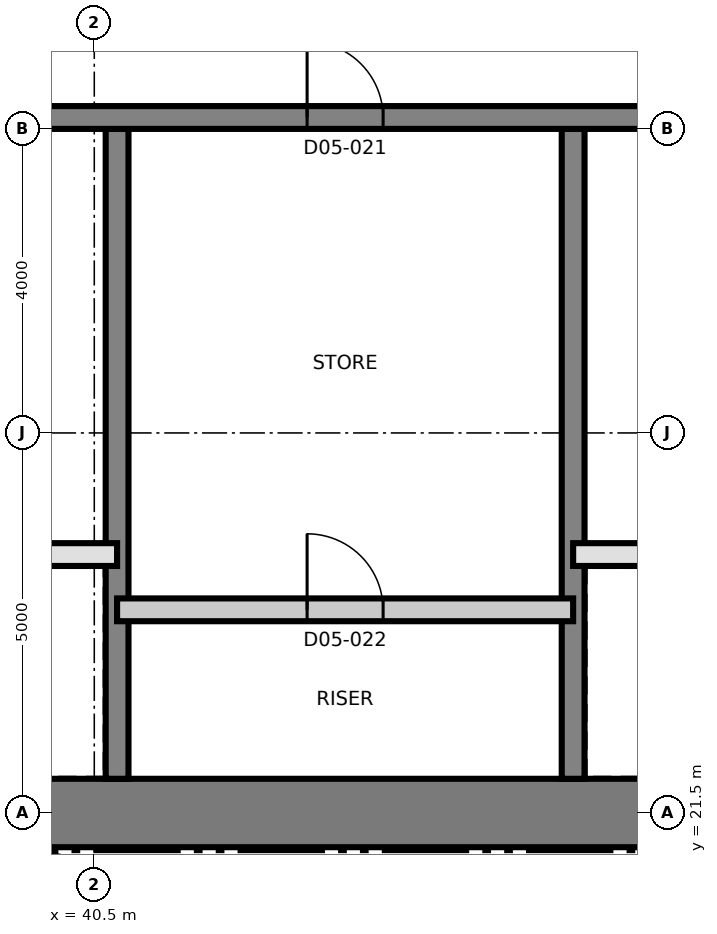
"""IFC4 building model, lengths in metres.
Left out: names, types, materials, properties, quantities, classifications, styles, units other than length and angle.
Written with IfcOpenShell. Run it as: python <this file> out.ifc"""

import sys

from ifc_helpers import new_model, si_unit, direction, frame, frame_2d, origin, place, context, subcontext, project, spatial, rectangle, extrude, element, fill, save


model = new_model("IFC4")
c1 = context("Model", 3, precision=1e-05, world=origin(), true_north=direction((0.0, 1.0)))
c2 = subcontext(c1, "Body", "Model", "MODEL_VIEW")
j1 = project(units=[si_unit("LENGTHUNIT", "METRE"), si_unit("PLANEANGLEUNIT", "RADIAN")], contexts=[c1])
p1 = place(None, origin())
s1 = spatial("IfcSite", under=j1, at=p1, CompositionType="ELEMENT")
p2 = place(p1, origin())
s2 = spatial("IfcBuilding", under=s1, at=p2, CompositionType="ELEMENT")
p3 = place(p2, frame((0.0, 0.0, 70.5)))
s3 = spatial("IfcBuildingStorey", under=s2, at=p3, CompositionType="ELEMENT", Elevation=70.5)
p4 = place(p3, frame((31.05, 21.5, 0.0), z_axis=(0.0, 0.0, 1.0), x_axis=(1.0, 0.0, 0.0)))
e1 = element("IfcWall", 1, at=p4, inside=s3, PredefinedType="SHEAR", context=c2, shape_type="SweptSolid", body=[
    extrude(rectangle(XDim=27.0, YDim=0.9, at=frame_2d((13.5, 0.0))), origin(), (0.0, 0.0, 1.0), 3.7),
])
for number, where, z_axis, x_axis in (
    (2, (40.8, 21.95, 0.0), (0.0, 0.0, 1.0), (0.0, 1.0, 0.0)),
    (3, (46.8, 21.95, 0.0), (0.0, 0.0, 1.0), (0.0, 1.0, 0.0)),
):
    element("IfcWall", number, at=place(p3, frame(where, z_axis=z_axis, x_axis=x_axis)), inside=s3, PredefinedType="SHEAR", context=c2, shape_type="SweptSolid", body=[
        extrude(rectangle(XDim=8.55, YDim=0.3, at=frame_2d((4.275, 0.0))), origin(), (0.0, 0.0, 1.0), 3.7),
    ])
p5 = place(p3, frame((31.95, 30.65, 0.0), z_axis=(0.0, 0.0, 1.0), x_axis=(1.0, 0.0, 0.0)))
e4 = element("IfcWall", 4, at=p5, inside=s3, PredefinedType="SHEAR", context=c2, shape_type="SweptSolid", body=[
    extrude(rectangle(XDim=26.1, YDim=0.3, at=frame_2d((13.05, 0.0))), origin(), (0.0, 0.0, 1.0), 3.7),
])
p6 = place(p5, frame((24.55, 0.0, 0.0)))
e5 = element("IfcOpeningElement", 5, at=p6, cuts=e4, PredefinedType="OPENING", context=c2, shape_type="SweptSolid", body=[
    extrude(rectangle(XDim=1.0, YDim=2.1, at=frame_2d((0.5, 1.05))), frame((0.0, 0.16, 0.0), z_axis=(0.0, -1.0, 0.0), x_axis=(1.0, 0.0, 0.0)), (0.0, 0.0, 1.0), 0.32),
])
p7 = place(p5, frame((11.35, 0.0, 0.0)))
e6 = element("IfcOpeningElement", 6, at=p7, cuts=e4, PredefinedType="OPENING", context=c2, shape_type="SweptSolid", body=[
    extrude(rectangle(XDim=1.0, YDim=2.1, at=frame_2d((0.5, 1.05))), frame((0.0, 0.16, 0.0), z_axis=(0.0, -1.0, 0.0), x_axis=(1.0, 0.0, 0.0)), (0.0, 0.0, 1.0), 0.32),
])
p8 = place(p3, frame((39.735, 20.846, 0.0), z_axis=(0.0, 0.0, 1.0), x_axis=(0.97206095595, -0.234728562212, 0.0)))
e7 = element("IfcWall", 7, at=p8, inside=s3, PredefinedType="SOLIDWALL", context=c2, shape_type="SweptSolid", body=[
    extrude(rectangle(XDim=2.35, YDim=0.3, at=frame_2d((1.175, 0.0))), origin(), (0.0, 0.0, 1.0), 3.4),
])
p9 = place(p3, frame((40.8, 24.173, 0.0), z_axis=(0.0, 0.0, 1.0), x_axis=(1.0, 0.0, 0.0)))
e8 = element("IfcWall", 8, at=p9, inside=s3, PredefinedType="PARTITIONING", context=c2, shape_type="SweptSolid", body=[
    extrude(rectangle(XDim=6.0, YDim=0.3, at=frame_2d((3.0, 0.0))), origin(), (0.0, 0.0, 1.0), 3.4),
])
p10 = place(p9, frame((2.5, 0.0, 0.0)))
e9 = element("IfcOpeningElement", 9, at=p10, cuts=e8, PredefinedType="OPENING", context=c2, shape_type="SweptSolid", body=[
    extrude(rectangle(XDim=1.0, YDim=2.1, at=frame_2d((0.5, 1.05))), frame((0.0, 0.16, 0.0), z_axis=(0.0, -1.0, 0.0), x_axis=(1.0, 0.0, 0.0)), (0.0, 0.0, 1.0), 0.32),
])
p11 = place(p3, frame((31.8, 24.9, 0.0), z_axis=(0.0, 0.0, 1.0), x_axis=(1.0, 0.0, 0.0)))
e10 = element("IfcWall", 10, at=p11, inside=s3, PredefinedType="SOLIDWALL", context=c2, shape_type="SweptSolid", body=[
    extrude(rectangle(XDim=9.0, YDim=0.3, at=frame_2d((4.5, 0.0))), origin(), (0.0, 0.0, 1.0), 3.4),
])
p12 = place(p11, frame((7.05, 0.0, 0.0)))
e11 = element("IfcOpeningElement", 11, at=p12, cuts=e10, PredefinedType="OPENING", context=c2, shape_type="SweptSolid", body=[
    extrude(rectangle(XDim=0.9, YDim=2.1, at=frame_2d((0.45, 1.05))), frame((0.0, 0.16, 0.0), z_axis=(0.0, -1.0, 0.0), x_axis=(1.0, 0.0, 0.0)), (0.0, 0.0, 1.0), 0.32),
])
p13 = place(p11, frame((0.95, 0.0, 0.0)))
e12 = element("IfcOpeningElement", 12, at=p13, cuts=e10, PredefinedType="OPENING", context=c2, shape_type="SweptSolid", body=[
    extrude(rectangle(XDim=1.1, YDim=2.4, at=frame_2d((0.55, 1.2))), frame((0.0, 0.16, 0.0), z_axis=(0.0, -1.0, 0.0), x_axis=(1.0, 0.0, 0.0)), (0.0, 0.0, 1.0), 0.32),
])
p14 = place(p11, frame((3.95, 0.0, 0.0)))
e13 = element("IfcOpeningElement", 13, at=p14, cuts=e10, PredefinedType="OPENING", context=c2, shape_type="SweptSolid", body=[
    extrude(rectangle(XDim=1.1, YDim=2.4, at=frame_2d((0.55, 1.2))), frame((0.0, 0.16, 0.0), z_axis=(0.0, -1.0, 0.0), x_axis=(1.0, 0.0, 0.0)), (0.0, 0.0, 1.0), 0.32),
])
p15 = place(p3, frame((46.8, 24.9, 0.0), z_axis=(0.0, 0.0, 1.0), x_axis=(1.0, 0.0, 0.0)))
e14 = element("IfcWall", 14, at=p15, inside=s3, PredefinedType="SOLIDWALL", context=c2, shape_type="SweptSolid", body=[
    extrude(rectangle(XDim=9.0, YDim=0.3, at=frame_2d((4.5, 0.0))), origin(), (0.0, 0.0, 1.0), 3.4),
])
p16 = place(p15, frame((1.05, 0.0, 0.0)))
e15 = element("IfcOpeningElement", 15, at=p16, cuts=e14, PredefinedType="OPENING", context=c2, shape_type="SweptSolid", body=[
    extrude(rectangle(XDim=0.9, YDim=2.1, at=frame_2d((0.45, 1.05))), frame((0.0, 0.16, 0.0), z_axis=(0.0, -1.0, 0.0), x_axis=(1.0, 0.0, 0.0)), (0.0, 0.0, 1.0), 0.32),
])
p17 = place(p7, origin())
e16 = element("IfcDoor", 16, at=p17, inside=s3, OperationType="SINGLE_SWING_LEFT", PredefinedType="DOOR", context=c2, shape_type="SweptSolid", body=[
    extrude(rectangle(XDim=1.0, YDim=2.1, at=frame_2d((0.5, 1.05))), frame((0.0, 0.025, 0.0), z_axis=(0.0, -1.0, 0.0), x_axis=(1.0, 0.0, 0.0)), (0.0, 0.0, 1.0), 0.05),
])
fill(e6, e16)
p18 = place(p10, origin())
e17 = element("IfcDoor", 17, at=p18, inside=s3, OperationType="SINGLE_SWING_RIGHT", PredefinedType="DOOR", context=c2, shape_type="SweptSolid", body=[
    extrude(rectangle(XDim=1.0, YDim=2.1, at=frame_2d((0.5, 1.05))), frame((0.0, 0.025, 0.0), z_axis=(0.0, -1.0, 0.0), x_axis=(1.0, 0.0, 0.0)), (0.0, 0.0, 1.0), 0.05),
])
fill(e9, e17)
save(model, sys.argv[1])
